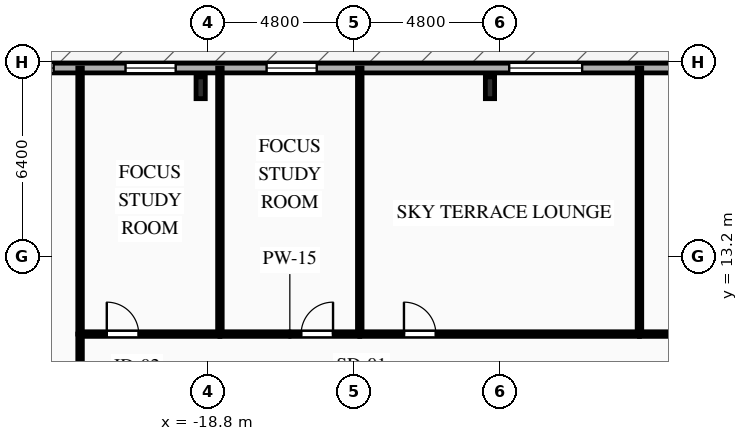
"""IFC4 building model, lengths in metres.
Left out: names, types, materials, properties, quantities, classifications, styles, units other than length and angle.
Written with IfcOpenShell. Run it as: python <this file> out.ifc"""

import sys

from ifc_helpers import new_model, si_unit, direction, frame, frame_2d, origin, origin_2d, place, context, subcontext, project, spatial, rectangle, i_section, extrude, element, fill, save


model = new_model("IFC4")
c1 = context("Model", 3, precision=1e-05, world=origin(), true_north=direction((0.0, 1.0)))
c2 = subcontext(c1, "Body", "Model", "MODEL_VIEW")
j1 = project(units=[si_unit("LENGTHUNIT", "METRE"), si_unit("PLANEANGLEUNIT", "RADIAN")], contexts=[c1])
p1 = place(None, origin())
s1 = spatial("IfcSite", under=j1, at=p1, CompositionType="ELEMENT")
p2 = place(p1, origin())
s2 = spatial("IfcBuilding", under=s1, at=p2, CompositionType="ELEMENT")
p3 = place(p2, frame((0.0, 0.0, 27.0)))
s3 = spatial("IfcBuildingStorey", under=s2, at=p3, CompositionType="ELEMENT", Elevation=27.0)
for number, where, z_axis, x_axis in (
    (1, (-9.517, 18.75, 0.0), (0.0, 0.0, 1.0), (1.0, 0.0, 0.0)),
    (2, (-19.033, 18.75, 0.0), (0.0, 0.0, 1.0), (1.0, 0.0, 0.0)),
):
    element("IfcColumn", number, at=place(p3, frame(where, z_axis=z_axis, x_axis=x_axis)), inside=s3, PredefinedType="COLUMN", context=c2, shape_type="SweptSolid", body=[
        extrude(i_section(OverallWidth=0.304, OverallDepth=0.716, WebThickness=0.021, FlangeThickness=0.04, FilletRadius=0.027, at=origin_2d()), origin(), (0.0, 0.0, 1.0), 3.35),
    ])
p4 = place(p3, frame((-29.2, 19.4, 0.0), z_axis=(0.0, 0.0, 1.0), x_axis=(1.0, 0.0, 0.0)))
e3 = element("IfcWall", 3, at=p4, inside=s3, PredefinedType="SOLIDWALL", context=c2, shape_type="SweptSolid", body=[
    extrude(rectangle(XDim=58.4, YDim=0.32, at=frame_2d((29.2, 0.0))), origin(), (0.0, 0.0, 1.0), 3.035),
])
p5 = place(p4, frame((1.5, 0.0, 0.0)))
e4 = element("IfcOpeningElement", 4, at=p5, cuts=e3, PredefinedType="OPENING", context=c2, shape_type="SweptSolid", body=[
    extrude(rectangle(XDim=1.5, YDim=2.2, at=frame_2d((0.75, 1.1))), frame((0.0, 0.17, 0.0), z_axis=(0.0, -1.0, 0.0), x_axis=(1.0, 0.0, 0.0)), (0.0, 0.0, 1.0), 0.34),
])
p6 = place(p4, frame((3.531, 0.0, 0.85)))
e5 = element("IfcOpeningElement", 5, at=p6, cuts=e3, PredefinedType="OPENING", context=c2, shape_type="SweptSolid", body=[
    extrude(rectangle(XDim=1.8, YDim=1.85, at=frame_2d((0.9, 0.925))), frame((0.0, 0.17, 0.0), z_axis=(0.0, -1.0, 0.0), x_axis=(1.0, 0.0, 0.0)), (0.0, 0.0, 1.0), 0.34),
])
p7 = place(p4, frame((7.695, 0.0, 0.85)))
e6 = element("IfcOpeningElement", 6, at=p7, cuts=e3, PredefinedType="OPENING", context=c2, shape_type="SweptSolid", body=[
    extrude(rectangle(XDim=1.65, YDim=1.85, at=frame_2d((0.825, 0.925))), frame((0.0, 0.17, 0.0), z_axis=(0.0, -1.0, 0.0), x_axis=(1.0, 0.0, 0.0)), (0.0, 0.0, 1.0), 0.34),
])
p8 = place(p4, frame((12.335, 0.0, 0.85)))
e7 = element("IfcOpeningElement", 7, at=p8, cuts=e3, PredefinedType="OPENING", context=c2, shape_type="SweptSolid", body=[
    extrude(rectangle(XDim=1.65, YDim=1.85, at=frame_2d((0.825, 0.925))), frame((0.0, 0.17, 0.0), z_axis=(0.0, -1.0, 0.0), x_axis=(1.0, 0.0, 0.0)), (0.0, 0.0, 1.0), 0.34),
])
p9 = place(p4, frame((20.315, 0.0, 0.85)))
e8 = element("IfcOpeningElement", 8, at=p9, cuts=e3, PredefinedType="OPENING", context=c2, shape_type="SweptSolid", body=[
    extrude(rectangle(XDim=2.4, YDim=1.95, at=frame_2d((1.2, 0.975))), frame((0.0, 0.17, 0.0), z_axis=(0.0, -1.0, 0.0), x_axis=(1.0, 0.0, 0.0)), (0.0, 0.0, 1.0), 0.34),
])
p10 = place(p4, frame((26.565, 0.0, 0.85)))
e9 = element("IfcOpeningElement", 9, at=p10, cuts=e3, PredefinedType="OPENING", context=c2, shape_type="SweptSolid", body=[
    extrude(rectangle(XDim=2.4, YDim=1.95, at=frame_2d((1.2, 0.975))), frame((0.0, 0.17, 0.0), z_axis=(0.0, -1.0, 0.0), x_axis=(1.0, 0.0, 0.0)), (0.0, 0.0, 1.0), 0.34),
])
p11 = place(p4, frame((36.356, 0.0, 0.85)))
e10 = element("IfcOpeningElement", 10, at=p11, cuts=e3, PredefinedType="OPENING", context=c2, shape_type="SweptSolid", body=[
    extrude(rectangle(XDim=2.2, YDim=1.85, at=frame_2d((1.1, 0.925))), frame((0.0, 0.17, 0.0), z_axis=(0.0, -1.0, 0.0), x_axis=(1.0, 0.0, 0.0)), (0.0, 0.0, 1.0), 0.34),
])
p12 = place(p4, frame((44.495, 0.0, 0.85)))
e11 = element("IfcOpeningElement", 11, at=p12, cuts=e3, PredefinedType="OPENING", context=c2, shape_type="SweptSolid", body=[
    extrude(rectangle(XDim=1.65, YDim=1.85, at=frame_2d((0.825, 0.925))), frame((0.0, 0.17, 0.0), z_axis=(0.0, -1.0, 0.0), x_axis=(1.0, 0.0, 0.0)), (0.0, 0.0, 1.0), 0.34),
])
p13 = place(p4, frame((49.095, 0.0, 0.85)))
e12 = element("IfcOpeningElement", 12, at=p13, cuts=e3, PredefinedType="OPENING", context=c2, shape_type="SweptSolid", body=[
    extrude(rectangle(XDim=1.65, YDim=1.85, at=frame_2d((0.825, 0.925))), frame((0.0, 0.17, 0.0), z_axis=(0.0, -1.0, 0.0), x_axis=(1.0, 0.0, 0.0)), (0.0, 0.0, 1.0), 0.34),
])
p14 = place(p3, frame((-23.0, 8.5, 0.0), z_axis=(0.0, 0.0, 1.0), x_axis=(0.0, 1.0, 0.0)))
e13 = element("IfcWall", 13, at=p14, inside=s3, PredefinedType="PARTITIONING", context=c2, shape_type="SweptSolid", body=[
    extrude(rectangle(XDim=2.15, YDim=0.15, at=frame_2d((1.075, 0.0))), origin(), (0.0, 0.0, 1.0), 3.035),
])
p15 = place(p3, frame((-23.0, 10.65, 0.0), z_axis=(0.0, 0.0, 1.0), x_axis=(1.0, 0.0, 0.0)))
e14 = element("IfcWall", 14, at=p15, inside=s3, PredefinedType="PARTITIONING", context=c2, shape_type="SweptSolid", body=[
    extrude(rectangle(XDim=4.6, YDim=0.15, at=frame_2d((2.3, 0.0))), origin(), (0.0, 0.0, 1.0), 3.035),
])
p16 = place(p15, frame((0.879, 0.0, 0.0)))
e15 = element("IfcOpeningElement", 15, at=p16, cuts=e14, PredefinedType="OPENING", context=c2, shape_type="SweptSolid", body=[
    extrude(rectangle(XDim=1.05, YDim=2.15, at=frame_2d((0.525, 1.075))), frame((0.0, 0.085, 0.0), z_axis=(0.0, -1.0, 0.0), x_axis=(1.0, 0.0, 0.0)), (0.0, 0.0, 1.0), 0.17),
])
p17 = place(p3, frame((-18.4, 10.65, 0.0), z_axis=(0.0, 0.0, 1.0), x_axis=(1.0, 0.0, 0.0)))
e16 = element("IfcWall", 16, at=p17, inside=s3, PredefinedType="PARTITIONING", context=c2, shape_type="SweptSolid", body=[
    extrude(rectangle(XDim=4.6, YDim=0.15, at=frame_2d((2.3, 0.0))), origin(), (0.0, 0.0, 1.0), 3.035),
])
p18 = place(p17, frame((2.671, 0.0, 0.0)))
e17 = element("IfcOpeningElement", 17, at=p18, cuts=e16, PredefinedType="OPENING", context=c2, shape_type="SweptSolid", body=[
    extrude(rectangle(XDim=1.05, YDim=2.15, at=frame_2d((0.525, 1.075))), frame((0.0, 0.085, 0.0), z_axis=(0.0, -1.0, 0.0), x_axis=(1.0, 0.0, 0.0)), (0.0, 0.0, 1.0), 0.17),
])
p19 = place(p3, frame((-13.8, 10.65, 0.0), z_axis=(0.0, 0.0, 1.0), x_axis=(1.0, 0.0, 0.0)))
e18 = element("IfcWall", 18, at=p19, inside=s3, PredefinedType="PARTITIONING", context=c2, shape_type="SweptSolid", body=[
    extrude(rectangle(XDim=9.2, YDim=0.15, at=frame_2d((4.6, 0.0))), origin(), (0.0, 0.0, 1.0), 3.035),
])
p20 = place(p19, frame((1.454, 0.0, 0.0)))
e19 = element("IfcOpeningElement", 19, at=p20, cuts=e18, PredefinedType="OPENING", context=c2, shape_type="SweptSolid", body=[
    extrude(rectangle(XDim=1.05, YDim=2.15, at=frame_2d((0.525, 1.075))), frame((0.0, 0.085, 0.0), z_axis=(0.0, -1.0, 0.0), x_axis=(1.0, 0.0, 0.0)), (0.0, 0.0, 1.0), 0.17),
])
p21 = place(p3, frame((-4.6, 10.65, 0.0), z_axis=(0.0, 0.0, 1.0), x_axis=(1.0, 0.0, 0.0)))
e20 = element("IfcWall", 20, at=p21, inside=s3, PredefinedType="PARTITIONING", context=c2, shape_type="SweptSolid", body=[
    extrude(rectangle(XDim=4.6, YDim=0.15, at=frame_2d((2.3, 0.0))), origin(), (0.0, 0.0, 1.0), 3.035),
])
p22 = place(p21, frame((2.074, 0.0, 0.0)))
e21 = element("IfcOpeningElement", 21, at=p22, cuts=e20, PredefinedType="OPENING", context=c2, shape_type="SweptSolid", body=[
    extrude(rectangle(XDim=1.05, YDim=2.15, at=frame_2d((0.525, 1.075))), frame((0.0, 0.085, 0.0), z_axis=(0.0, -1.0, 0.0), x_axis=(1.0, 0.0, 0.0)), (0.0, 0.0, 1.0), 0.17),
])
for number, where, z_axis, x_axis in (
    (22, (-23.0, 19.4, 0.0), (0.0, 0.0, 1.0), (0.0, -1.0, 0.0)),
    (23, (-18.4, 19.4, 0.0), (0.0, 0.0, 1.0), (0.0, -1.0, 0.0)),
    (24, (-13.8, 19.4, 0.0), (0.0, 0.0, 1.0), (0.0, -1.0, 0.0)),
    (25, (-4.6, 19.4, 0.0), (0.0, 0.0, 1.0), (0.0, -1.0, 0.0)),
):
    element("IfcWall", number, at=place(p3, frame(where, z_axis=z_axis, x_axis=x_axis)), inside=s3, PredefinedType="PARTITIONING", context=c2, shape_type="SweptSolid", body=[
        extrude(rectangle(XDim=8.75, YDim=0.15, at=frame_2d((4.375, 0.0))), origin(), (0.0, 0.0, 1.0), 3.035),
    ])
p23 = place(p6, origin())
e26 = element("IfcWindow", 26, at=p23, inside=s3, PartitioningType="SINGLE_PANEL", PredefinedType="WINDOW", context=c2, shape_type="SweptSolid", body=[
    extrude(rectangle(XDim=1.8, YDim=1.85, at=frame_2d((0.9, 0.925))), frame((0.0, 0.03, 0.0), z_axis=(0.0, -1.0, 0.0), x_axis=(1.0, 0.0, 0.0)), (0.0, 0.0, 1.0), 0.06),
])
fill(e5, e26)
p24 = place(p7, origin())
e27 = element("IfcWindow", 27, at=p24, inside=s3, PartitioningType="SINGLE_PANEL", PredefinedType="WINDOW", context=c2, shape_type="SweptSolid", body=[
    extrude(rectangle(XDim=1.65, YDim=1.85, at=frame_2d((0.825, 0.925))), frame((0.0, 0.03, 0.0), z_axis=(0.0, -1.0, 0.0), x_axis=(1.0, 0.0, 0.0)), (0.0, 0.0, 1.0), 0.06),
])
fill(e6, e27)
p25 = place(p8, origin())
e28 = element("IfcWindow", 28, at=p25, inside=s3, PartitioningType="SINGLE_PANEL", PredefinedType="WINDOW", context=c2, shape_type="SweptSolid", body=[
    extrude(rectangle(XDim=1.65, YDim=1.85, at=frame_2d((0.825, 0.925))), frame((0.0, 0.03, 0.0), z_axis=(0.0, -1.0, 0.0), x_axis=(1.0, 0.0, 0.0)), (0.0, 0.0, 1.0), 0.06),
])
fill(e7, e28)
p26 = place(p9, origin())
e29 = element("IfcWindow", 29, at=p26, inside=s3, PartitioningType="SINGLE_PANEL", PredefinedType="WINDOW", context=c2, shape_type="SweptSolid", body=[
    extrude(rectangle(XDim=2.4, YDim=1.95, at=frame_2d((1.2, 0.975))), frame((0.0, 0.03, 0.0), z_axis=(0.0, -1.0, 0.0), x_axis=(1.0, 0.0, 0.0)), (0.0, 0.0, 1.0), 0.06),
])
fill(e8, e29)
p27 = place(p16, origin())
e30 = element("IfcDoor", 30, at=p27, inside=s3, OperationType="SINGLE_SWING_LEFT", PredefinedType="DOOR", context=c2, shape_type="SweptSolid", body=[
    extrude(rectangle(XDim=1.05, YDim=2.15, at=frame_2d((0.525, 1.075))), frame((0.0, 0.025, 0.0), z_axis=(0.0, -1.0, 0.0), x_axis=(1.0, 0.0, 0.0)), (0.0, 0.0, 1.0), 0.05),
])
fill(e15, e30)
p28 = place(p18, origin())
e31 = element("IfcDoor", 31, at=p28, inside=s3, OperationType="SINGLE_SWING_RIGHT", PredefinedType="DOOR", context=c2, shape_type="SweptSolid", body=[
    extrude(rectangle(XDim=1.05, YDim=2.15, at=frame_2d((0.525, 1.075))), frame((0.0, 0.025, 0.0), z_axis=(0.0, -1.0, 0.0), x_axis=(1.0, 0.0, 0.0)), (0.0, 0.0, 1.0), 0.05),
])
fill(e17, e31)
p29 = place(p20, origin())
e32 = element("IfcDoor", 32, at=p29, inside=s3, OperationType="SINGLE_SWING_LEFT", PredefinedType="DOOR", context=c2, shape_type="SweptSolid", body=[
    extrude(rectangle(XDim=1.05, YDim=2.15, at=frame_2d((0.525, 1.075))), frame((0.0, 0.025, 0.0), z_axis=(0.0, -1.0, 0.0), x_axis=(1.0, 0.0, 0.0)), (0.0, 0.0, 1.0), 0.05),
])
fill(e19, e32)
save(model, sys.argv[1])
